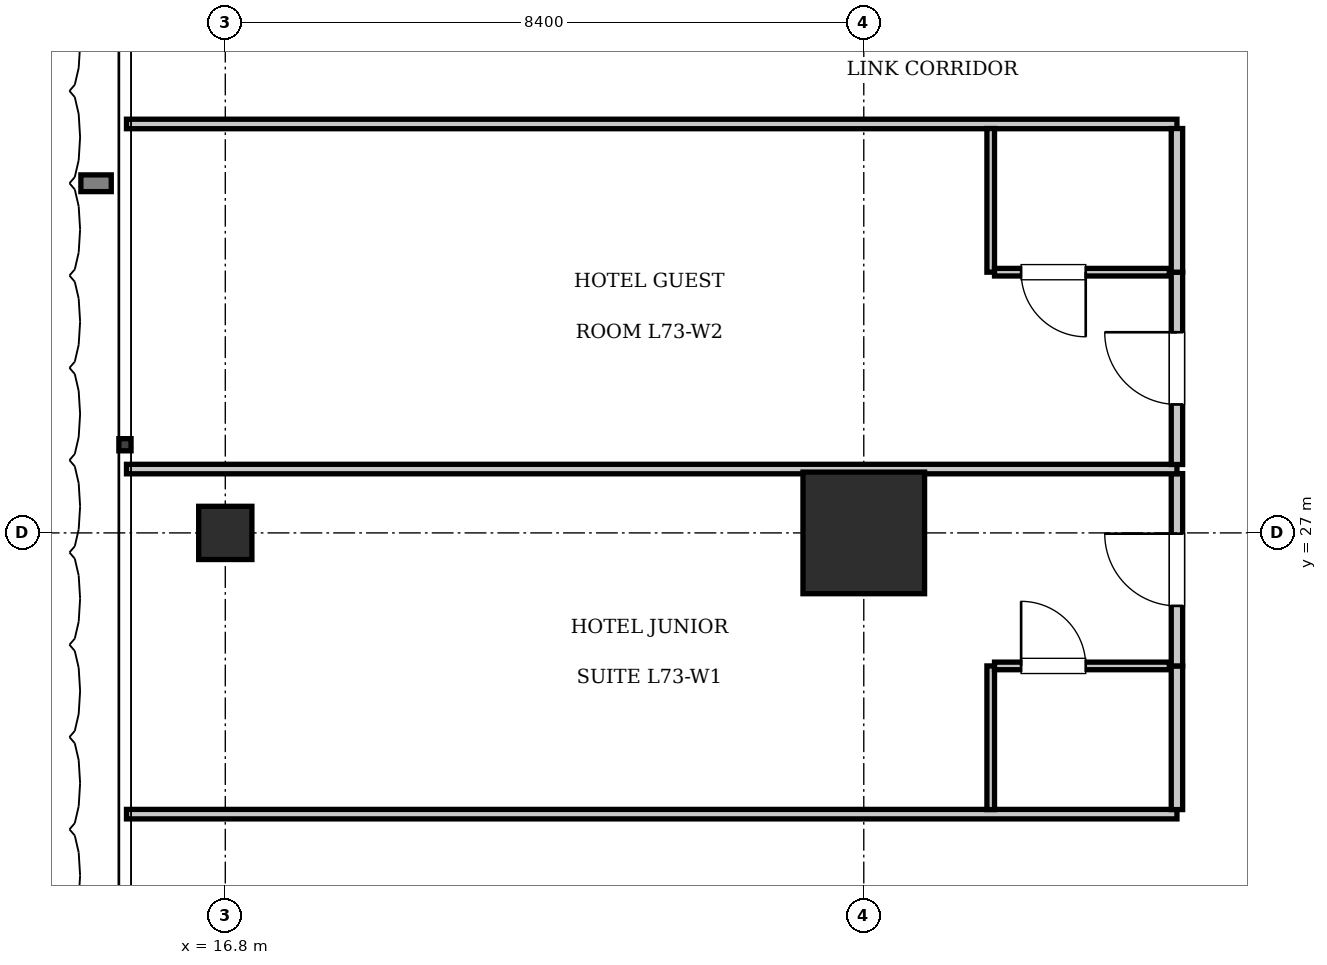
"""IFC4 building model, lengths in metres.
Left out: names, types, materials, properties, quantities, classifications, styles, units other than length and angle.
Written with IfcOpenShell. Run it as: python <this file> out.ifc"""

import sys

from ifc_helpers import new_model, si_unit, direction, frame, frame_2d, origin, origin_2d, place, context, subcontext, project, spatial, rectangle, extrude, element, fill, save


model = new_model("IFC4")
c1 = context("Model", 3, precision=1e-05, world=origin(), true_north=direction((0.0, 1.0)))
c2 = subcontext(c1, "Body", "Model", "MODEL_VIEW")
j1 = project(units=[si_unit("LENGTHUNIT", "METRE"), si_unit("PLANEANGLEUNIT", "RADIAN")], contexts=[c1])
p1 = place(None, origin())
s1 = spatial("IfcSite", under=j1, at=p1, CompositionType="ELEMENT")
p2 = place(p1, origin())
s2 = spatial("IfcBuilding", under=s1, at=p2, CompositionType="ELEMENT")
p3 = place(p2, frame((0.0, 0.0, 297.15)))
s3 = spatial("IfcBuildingStorey", under=s2, at=p3, CompositionType="ELEMENT", Elevation=297.15)
p4 = place(p3, frame((25.2, 27.0, 0.0), z_axis=(0.0, 0.0, 1.0), x_axis=(1.0, 0.0, 0.0)))
e1 = element("IfcColumn", 1, at=p4, inside=s3, PredefinedType="COLUMN", context=c2, shape_type="SweptSolid", body=[
    extrude(rectangle(XDim=1.6, YDim=1.6, at=origin_2d()), origin(), (0.0, 0.0, 1.0), 3.85),
])
p5 = place(p3, frame((16.8, 27.0, 0.0), z_axis=(0.0, 0.0, 1.0), x_axis=(1.0, 0.0, 0.0)))
e2 = element("IfcColumn", 2, at=p5, inside=s3, PredefinedType="COLUMN", context=c2, shape_type="SweptSolid", body=[
    extrude(rectangle(XDim=0.7, YDim=0.7, at=origin_2d()), origin(), (0.0, 0.0, 1.0), 3.85),
])
for number, where, z_axis, x_axis in (
    (3, (15.5, 23.3, 0.0), (0.0, 0.0, 1.0), (1.0, 0.0, 0.0)),
    (4, (15.5, 32.38, 0.0), (0.0, 0.0, 1.0), (1.0, 0.0, 0.0)),
):
    element("IfcWall", number, at=place(p3, frame(where, z_axis=z_axis, x_axis=x_axis)), inside=s3, PredefinedType="PARTITIONING", context=c2, shape_type="SweptSolid", body=[
        extrude(rectangle(XDim=13.82, YDim=0.125, at=frame_2d((6.91, 0.0))), origin(), (0.0, 0.0, 1.0), 3.61),
    ])
p6 = place(p3, frame((29.32, 23.36, 0.0), z_axis=(0.0, 0.0, 1.0), x_axis=(0.0, 1.0, 0.0)))
e5 = element("IfcWall", 5, at=p6, inside=s3, PredefinedType="PARTITIONING", context=c2, shape_type="SweptSolid", body=[
    extrude(rectangle(XDim=1.89, YDim=0.15, at=frame_2d((0.945, 0.0))), origin(), (0.0, 0.0, 1.0), 3.61),
])
p7 = place(p3, frame((29.32, 25.25, 0.0), z_axis=(0.0, 0.0, 1.0), x_axis=(0.0, 1.0, 0.0)))
e6 = element("IfcWall", 6, at=p7, inside=s3, PredefinedType="PARTITIONING", context=c2, shape_type="SweptSolid", body=[
    extrude(rectangle(XDim=2.53, YDim=0.15, at=frame_2d((1.265, 0.0))), origin(), (0.0, 0.0, 1.0), 3.61),
])
p8 = place(p7, frame((0.79, 0.0, 0.0)))
e7 = element("IfcOpeningElement", 7, at=p8, cuts=e6, PredefinedType="OPENING", context=c2, shape_type="SweptSolid", body=[
    extrude(rectangle(XDim=0.95, YDim=2.15, at=frame_2d((0.475, 1.075))), frame((0.0, 0.085, 0.0), z_axis=(0.0, -1.0, 0.0), x_axis=(1.0, 0.0, 0.0)), (0.0, 0.0, 1.0), 0.17),
])
p9 = place(p3, frame((26.87, 23.36, 0.0), z_axis=(0.0, 0.0, 1.0), x_axis=(0.0, 1.0, 0.0)))
e8 = element("IfcWall", 8, at=p9, inside=s3, PredefinedType="PARTITIONING", context=c2, shape_type="SweptSolid", body=[
    extrude(rectangle(XDim=1.89, YDim=0.1, at=frame_2d((0.945, 0.0))), origin(), (0.0, 0.0, 1.0), 3.61),
])
p10 = place(p3, frame((26.92, 25.25, 0.0), z_axis=(0.0, 0.0, 1.0), x_axis=(1.0, 0.0, 0.0)))
e9 = element("IfcWall", 9, at=p10, inside=s3, PredefinedType="PARTITIONING", context=c2, shape_type="SweptSolid", body=[
    extrude(rectangle(XDim=2.3, YDim=0.1, at=frame_2d((1.15, 0.0))), origin(), (0.0, 0.0, 1.0), 3.61),
])
p11 = place(p10, frame((0.35, 0.0, 0.0)))
e10 = element("IfcOpeningElement", 10, at=p11, cuts=e9, PredefinedType="OPENING", context=c2, shape_type="SweptSolid", body=[
    extrude(rectangle(XDim=0.85, YDim=2.1, at=frame_2d((0.425, 1.05))), frame((0.0, 0.06, 0.0), z_axis=(0.0, -1.0, 0.0), x_axis=(1.0, 0.0, 0.0)), (0.0, 0.0, 1.0), 0.12),
])
p12 = place(p3, frame((15.5, 27.84, 0.0), z_axis=(0.0, 0.0, 1.0), x_axis=(1.0, 0.0, 0.0)))
e11 = element("IfcWall", 11, at=p12, inside=s3, PredefinedType="PARTITIONING", context=c2, shape_type="SweptSolid", body=[
    extrude(rectangle(XDim=13.82, YDim=0.125, at=frame_2d((6.91, 0.0))), origin(), (0.0, 0.0, 1.0), 3.61),
])
p13 = place(p3, frame((29.32, 27.9, 0.0), z_axis=(0.0, 0.0, 1.0), x_axis=(0.0, 1.0, 0.0)))
e12 = element("IfcWall", 12, at=p13, inside=s3, PredefinedType="PARTITIONING", context=c2, shape_type="SweptSolid", body=[
    extrude(rectangle(XDim=2.53, YDim=0.15, at=frame_2d((1.265, 0.0))), origin(), (0.0, 0.0, 1.0), 3.61),
])
p14 = place(p13, frame((0.79, 0.0, 0.0)))
e13 = element("IfcOpeningElement", 13, at=p14, cuts=e12, PredefinedType="OPENING", context=c2, shape_type="SweptSolid", body=[
    extrude(rectangle(XDim=0.95, YDim=2.15, at=frame_2d((0.475, 1.075))), frame((0.0, 0.085, 0.0), z_axis=(0.0, -1.0, 0.0), x_axis=(1.0, 0.0, 0.0)), (0.0, 0.0, 1.0), 0.17),
])
p15 = place(p3, frame((29.32, 30.43, 0.0), z_axis=(0.0, 0.0, 1.0), x_axis=(0.0, 1.0, 0.0)))
e14 = element("IfcWall", 14, at=p15, inside=s3, PredefinedType="PARTITIONING", context=c2, shape_type="SweptSolid", body=[
    extrude(rectangle(XDim=1.89, YDim=0.15, at=frame_2d((0.945, 0.0))), origin(), (0.0, 0.0, 1.0), 3.61),
])
p16 = place(p3, frame((26.87, 30.43, 0.0), z_axis=(0.0, 0.0, 1.0), x_axis=(0.0, 1.0, 0.0)))
e15 = element("IfcWall", 15, at=p16, inside=s3, PredefinedType="PARTITIONING", context=c2, shape_type="SweptSolid", body=[
    extrude(rectangle(XDim=1.89, YDim=0.1, at=frame_2d((0.945, 0.0))), origin(), (0.0, 0.0, 1.0), 3.61),
])
p17 = place(p3, frame((26.92, 30.43, 0.0), z_axis=(0.0, 0.0, 1.0), x_axis=(1.0, 0.0, 0.0)))
e16 = element("IfcWall", 16, at=p17, inside=s3, PredefinedType="PARTITIONING", context=c2, shape_type="SweptSolid", body=[
    extrude(rectangle(XDim=2.3, YDim=0.1, at=frame_2d((1.15, 0.0))), origin(), (0.0, 0.0, 1.0), 3.61),
])
p18 = place(p17, frame((0.35, 0.0, 0.0)))
e17 = element("IfcOpeningElement", 17, at=p18, cuts=e16, PredefinedType="OPENING", context=c2, shape_type="SweptSolid", body=[
    extrude(rectangle(XDim=0.85, YDim=2.1, at=frame_2d((0.425, 1.05))), frame((0.0, 0.06, 0.0), z_axis=(0.0, -1.0, 0.0), x_axis=(1.0, 0.0, 0.0)), (0.0, 0.0, 1.0), 0.12),
])
p19 = place(p11, origin())
e18 = element("IfcDoor", 18, at=p19, inside=s3, OperationType="SINGLE_SWING_LEFT", PredefinedType="DOOR", context=c2, shape_type="SweptSolid", body=[
    extrude(rectangle(XDim=0.85, YDim=2.1, at=frame_2d((0.425, 1.05))), frame((0.0, 0.025, 0.0), z_axis=(0.0, -1.0, 0.0), x_axis=(1.0, 0.0, 0.0)), (0.0, 0.0, 1.0), 0.05),
])
fill(e10, e18)
p20 = place(p8, origin())
e19 = element("IfcDoor", 19, at=p20, inside=s3, OperationType="SINGLE_SWING_RIGHT", PredefinedType="DOOR", context=c2, shape_type="SweptSolid", body=[
    extrude(rectangle(XDim=0.95, YDim=2.15, at=frame_2d((0.475, 1.075))), frame((0.0, 0.025, 0.0), z_axis=(0.0, -1.0, 0.0), x_axis=(1.0, 0.0, 0.0)), (0.0, 0.0, 1.0), 0.05),
])
fill(e7, e19)
p21 = place(p18, frame((0.85, 0.0, 0.0), z_axis=(0.0, 0.0, 1.0), x_axis=(-1.0, 0.0, 0.0)))
e20 = element("IfcDoor", 20, at=p21, inside=s3, OperationType="SINGLE_SWING_LEFT", PredefinedType="DOOR", context=c2, shape_type="SweptSolid", body=[
    extrude(rectangle(XDim=0.85, YDim=2.1, at=frame_2d((0.425, 1.05))), frame((0.0, 0.025, 0.0), z_axis=(0.0, -1.0, 0.0), x_axis=(1.0, 0.0, 0.0)), (0.0, 0.0, 1.0), 0.05),
])
fill(e17, e20)
p22 = place(p14, origin())
e21 = element("IfcDoor", 21, at=p22, inside=s3, OperationType="SINGLE_SWING_RIGHT", PredefinedType="DOOR", context=c2, shape_type="SweptSolid", body=[
    extrude(rectangle(XDim=0.95, YDim=2.15, at=frame_2d((0.475, 1.075))), frame((0.0, 0.025, 0.0), z_axis=(0.0, -1.0, 0.0), x_axis=(1.0, 0.0, 0.0)), (0.0, 0.0, 1.0), 0.05),
])
fill(e13, e21)
save(model, sys.argv[1])
